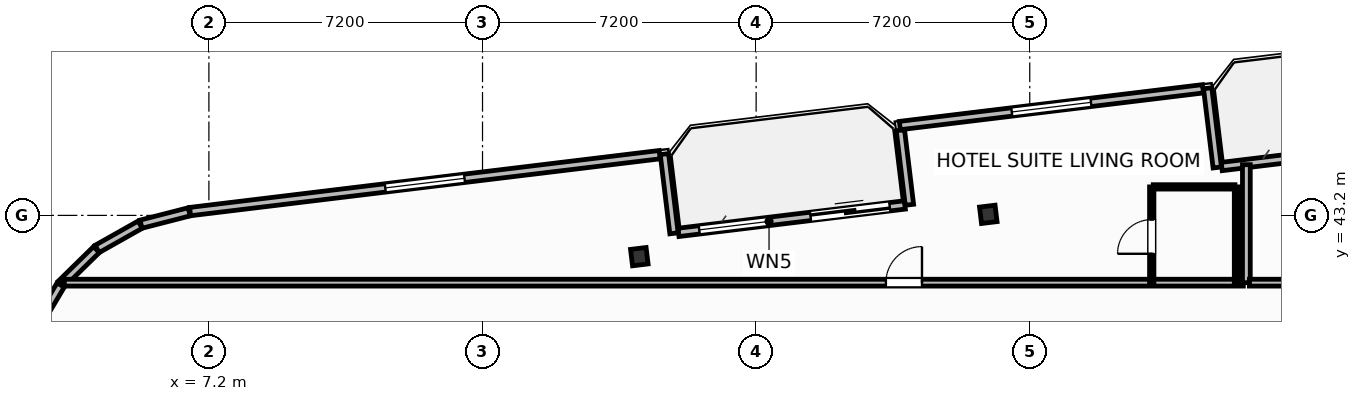
"""IFC4 building model, lengths in metres.
Left out: names, types, materials, properties, quantities, classifications, styles, units other than length and angle.
Written with IfcOpenShell. Run it as: python <this file> out.ifc"""

import sys

from ifc_helpers import new_model, si_unit, direction, frame, frame_2d, origin, origin_2d, place, context, subcontext, project, spatial, rectangle, i_section, extrude, element, fill, save


model = new_model("IFC4")
c1 = context("Model", 3, precision=1e-05, world=origin(), true_north=direction((0.0, 1.0)))
c2 = subcontext(c1, "Body", "Model", "MODEL_VIEW")
j1 = project(units=[si_unit("LENGTHUNIT", "METRE"), si_unit("PLANEANGLEUNIT", "RADIAN")], contexts=[c1])
p1 = place(None, origin())
s1 = spatial("IfcSite", under=j1, at=p1, CompositionType="ELEMENT")
p2 = place(p1, origin())
s2 = spatial("IfcBuilding", under=s1, at=p2, CompositionType="ELEMENT")
p3 = place(p2, frame((0.0, 0.0, 167.2)))
s3 = spatial("IfcBuildingStorey", under=s2, at=p3, CompositionType="ELEMENT", Elevation=167.2)
for number, where, z_axis, x_axis in (
    (1, (27.709, 43.227, 0.0), (0.0, 0.0, 1.0), (0.993, 0.12, 0.0)),
    (2, (18.526, 42.114, 0.0), (0.0, 0.0, 1.0), (0.993, 0.12, 0.0)),
):
    element("IfcColumn", number, at=place(p3, frame(where, z_axis=z_axis, x_axis=x_axis)), inside=s3, PredefinedType="COLUMN", context=c2, shape_type="SweptSolid", body=[
        extrude(i_section(OverallWidth=0.412, OverallDepth=0.435, WebThickness=0.036, FlangeThickness=0.057, FilletRadius=0.025, at=origin_2d()), origin(), (0.0, 0.0, 1.0), 3.7),
    ])
p4 = place(p3, frame((19.557, 42.753, 0.0), z_axis=(0.0, 0.0, 1.0), x_axis=(0.992729951822, 0.120362962556, 0.0)))
e3 = element("IfcWall", 3, at=p4, inside=s3, PredefinedType="SOLIDWALL", context=c2, shape_type="SweptSolid", body=[
    extrude(rectangle(XDim=6.0, YDim=0.22, at=frame_2d((3.0, 0.0))), origin(), (0.0, 0.0, 1.0), 2.73),
])
p5 = place(p4, frame((3.5, 0.0, 0.0)))
e4 = element("IfcOpeningElement", 4, at=p5, cuts=e3, PredefinedType="OPENING", context=c2, shape_type="SweptSolid", body=[
    extrude(rectangle(XDim=2.1, YDim=2.3, at=frame_2d((1.05, 1.15))), frame((0.0, 0.12, 0.0), z_axis=(0.0, -1.0, 0.0), x_axis=(1.0, 0.0, 0.0)), (0.0, 0.0, 1.0), 0.24),
])
p6 = place(p4, frame((0.55, 0.0, 0.75)))
e5 = element("IfcOpeningElement", 5, at=p6, cuts=e3, PredefinedType="OPENING", context=c2, shape_type="SweptSolid", body=[
    extrude(rectangle(XDim=1.85, YDim=1.75, at=frame_2d((0.925, 0.875))), frame((0.0, 0.12, 0.0), z_axis=(0.0, -1.0, 0.0), x_axis=(1.0, 0.0, 0.0)), (0.0, 0.0, 1.0), 0.24),
])
p7 = place(p3, frame((33.852, 44.486, 0.0), z_axis=(0.0, 0.0, 1.0), x_axis=(0.992729951822, 0.120362962556, 0.0)))
e6 = element("IfcWall", 6, at=p7, inside=s3, PredefinedType="SOLIDWALL", context=c2, shape_type="SweptSolid", body=[
    extrude(rectangle(XDim=6.0, YDim=0.22, at=frame_2d((3.0, 0.0))), origin(), (0.0, 0.0, 1.0), 2.73),
])
p8 = place(p7, frame((3.5, 0.0, 0.0)))
e7 = element("IfcOpeningElement", 7, at=p8, cuts=e6, PredefinedType="OPENING", context=c2, shape_type="SweptSolid", body=[
    extrude(rectangle(XDim=2.1, YDim=2.3, at=frame_2d((1.05, 1.15))), frame((0.0, 0.12, 0.0), z_axis=(0.0, -1.0, 0.0), x_axis=(1.0, 0.0, 0.0)), (0.0, 0.0, 1.0), 0.24),
])
p9 = place(p3, frame((33.734, 44.461, 0.0), z_axis=(0.0, 0.0, 1.0), x_axis=(-0.120327895535, 0.992734202874, 0.0)))
e8 = element("IfcWall", 8, at=p9, inside=s3, PredefinedType="SOLIDWALL", context=c2, shape_type="SweptSolid", body=[
    extrude(rectangle(XDim=2.1, YDim=0.22, at=frame_2d((1.05, 0.0))), origin(), (0.0, 0.0, 1.0), 2.73),
])
p10 = place(p3, frame((33.357, 46.531, 0.0), z_axis=(0.0, 0.0, 1.0), x_axis=(-0.992731032022, -0.120354052946, 0.0)))
e9 = element("IfcWall", 9, at=p10, inside=s3, PredefinedType="SOLIDWALL", context=c2, shape_type="SweptSolid", body=[
    extrude(rectangle(XDim=8.035, YDim=0.22, at=frame_2d((4.018, 0.0))), origin(), (0.0, 0.0, 1.0), 2.73),
])
p11 = place(p10, frame((2.968, 0.0, 0.8)))
e10 = element("IfcOpeningElement", 10, at=p11, cuts=e9, PredefinedType="OPENING", context=c2, shape_type="SweptSolid", body=[
    extrude(rectangle(XDim=2.1, YDim=1.75, at=frame_2d((1.05, 0.875))), frame((0.0, 0.12, 0.0), z_axis=(0.0, -1.0, 0.0), x_axis=(1.0, 0.0, 0.0)), (0.0, 0.0, 1.0), 0.24),
])
p12 = place(p3, frame((25.396, 45.44, 0.0), z_axis=(0.0, 0.0, 1.0), x_axis=(0.120275992932, -0.992740492538, 0.0)))
e11 = element("IfcWall", 11, at=p12, inside=s3, PredefinedType="SOLIDWALL", context=c2, shape_type="SweptSolid", body=[
    extrude(rectangle(XDim=1.975, YDim=0.22, at=frame_2d((0.988, 0.0))), origin(), (0.0, 0.0, 1.0), 2.73),
])
p13 = place(p3, frame((19.439, 42.729, 0.0), z_axis=(0.0, 0.0, 1.0), x_axis=(-0.120327895535, 0.992734202874, 0.0)))
e12 = element("IfcWall", 12, at=p13, inside=s3, PredefinedType="SOLIDWALL", context=c2, shape_type="SweptSolid", body=[
    extrude(rectangle(XDim=2.1, YDim=0.22, at=frame_2d((1.05, 0.0))), origin(), (0.0, 0.0, 1.0), 2.73),
])
p14 = place(p3, frame((19.062, 44.798, 0.0), z_axis=(0.0, 0.0, 1.0), x_axis=(-0.992733569027, -0.120333124809, 0.0)))
e13 = element("IfcWall", 13, at=p14, inside=s3, PredefinedType="SOLIDWALL", context=c2, shape_type="SweptSolid", body=[
    extrude(rectangle(XDim=12.447, YDim=0.22, at=frame_2d((6.224, 0.0))), origin(), (0.0, 0.0, 1.0), 2.73),
])
p15 = place(p14, frame((5.174, 0.0, 0.8)))
e14 = element("IfcOpeningElement", 14, at=p15, cuts=e13, PredefinedType="OPENING", context=c2, shape_type="SweptSolid", body=[
    extrude(rectangle(XDim=2.1, YDim=1.75, at=frame_2d((1.05, 0.875))), frame((0.0, 0.12, 0.0), z_axis=(0.0, -1.0, 0.0), x_axis=(1.0, 0.0, 0.0)), (0.0, 0.0, 1.0), 0.24),
])
p16 = place(p3, frame((6.681, 43.294, 0.0), z_axis=(0.0, 0.0, 1.0), x_axis=(-0.968496788899, -0.2490260426, 0.0)))
e15 = element("IfcWall", 15, at=p16, inside=s3, PredefinedType="SOLIDWALL", context=c2, shape_type="SweptSolid", body=[
    extrude(rectangle(XDim=1.309, YDim=0.22, at=frame_2d((0.654, 0.0))), origin(), (0.0, 0.0, 1.0), 2.73),
])
for number, where, z_axis, x_axis in (
    (16, (5.392, 42.956, 0.0), (0.0, 0.0, 1.0), (-0.871, -0.491, 0.0)),
    (17, (4.241, 42.3, 0.0), (0.0, 0.0, 1.0), (-0.714, -0.7, 0.0)),
):
    element("IfcWall", number, at=place(p3, frame(where, z_axis=z_axis, x_axis=x_axis)), inside=s3, PredefinedType="SOLIDWALL", context=c2, shape_type="SweptSolid", body=[
        extrude(rectangle(XDim=1.301, YDim=0.22, at=frame_2d((0.65, 0.0))), origin(), (0.0, 0.0, 1.0), 2.73),
    ])
p17 = place(p3, frame((3.299, 41.368, 0.0), z_axis=(0.0, 0.0, 1.0), x_axis=(-0.508716668029, -0.860933999601, 0.0)))
e18 = element("IfcWall", 18, at=p17, inside=s3, PredefinedType="SOLIDWALL", context=c2, shape_type="SweptSolid", body=[
    extrude(rectangle(XDim=1.301, YDim=0.22, at=frame_2d((0.65, 0.0))), origin(), (0.0, 0.0, 1.0), 2.73),
])
p18 = place(p3, frame((3.393, 41.43, 0.0), z_axis=(0.0, 0.0, 1.0), x_axis=(1.0, 0.0, 0.0)))
e19 = element("IfcWall", 19, at=p18, inside=s3, PredefinedType="PARTITIONING", context=c2, shape_type="SweptSolid", body=[
    extrude(rectangle(XDim=31.027, YDim=0.18, at=frame_2d((15.513, 0.0))), origin(), (0.0, 0.0, 1.0), 2.662),
])
p19 = place(p18, frame((21.621, 0.0, 0.0)))
e20 = element("IfcOpeningElement", 20, at=p19, cuts=e19, PredefinedType="OPENING", context=c2, shape_type="SweptSolid", body=[
    extrude(rectangle(XDim=0.95, YDim=2.15, at=frame_2d((0.475, 1.075))), frame((0.0, 0.1, 0.0), z_axis=(0.0, -1.0, 0.0), x_axis=(1.0, 0.0, 0.0)), (0.0, 0.0, 1.0), 0.2),
])
p20 = place(p3, frame((32.05, 43.95, 0.0), z_axis=(0.0, 0.0, 1.0), x_axis=(1.0, 0.0, 0.0)))
e21 = element("IfcWall", 21, at=p20, inside=s3, PredefinedType="PARTITIONING", context=c2, shape_type="SweptSolid", body=[
    extrude(rectangle(XDim=2.15, YDim=0.115, at=frame_2d((1.075, 0.0))), origin(), (0.0, 0.0, 1.0), 2.824),
])
p21 = place(p3, frame((32.01, 41.43, 0.0), z_axis=(0.0, 0.0, 1.0), x_axis=(0.0, 1.0, 0.0)))
e22 = element("IfcWall", 22, at=p21, inside=s3, PredefinedType="PARTITIONING", context=c2, shape_type="SweptSolid", body=[
    extrude(rectangle(XDim=2.52, YDim=0.115, at=frame_2d((1.26, 0.0))), origin(), (0.0, 0.0, 1.0), 3.45),
])
p22 = place(p21, frame((0.76, 0.0, 0.0)))
e23 = element("IfcOpeningElement", 23, at=p22, cuts=e22, PredefinedType="OPENING", context=c2, shape_type="SweptSolid", body=[
    extrude(rectangle(XDim=0.9, YDim=2.05, at=frame_2d((0.45, 1.025))), frame((0.0, 0.067, 0.0), z_axis=(0.0, -1.0, 0.0), x_axis=(1.0, 0.0, 0.0)), (0.0, 0.0, 1.0), 0.135),
])
p23 = place(p3, frame((34.24, 41.43, 0.0), z_axis=(0.0, 0.0, 1.0), x_axis=(0.0, 1.0, 0.0)))
e24 = element("IfcWall", 24, at=p23, inside=s3, PredefinedType="PARTITIONING", context=c2, shape_type="SweptSolid", body=[
    extrude(rectangle(XDim=2.52, YDim=0.115, at=frame_2d((1.26, 0.0))), origin(), (0.0, 0.0, 1.0), 3.45),
])
p24 = place(p3, frame((34.5, 41.43, 0.0), z_axis=(0.0, 0.0, 1.0), x_axis=(0.0, 1.0, 0.0)))
e25 = element("IfcWall", 25, at=p24, inside=s3, PredefinedType="PARTITIONING", context=c2, shape_type="SweptSolid", body=[
    extrude(rectangle(XDim=3.104, YDim=0.205, at=frame_2d((1.552, 0.0))), origin(), (0.0, 0.0, 1.0), 3.45),
])
p25 = place(p3, frame((34.58, 41.43, 0.0), z_axis=(0.0, 0.0, 1.0), x_axis=(1.0, 0.0, 0.0)))
e26 = element("IfcWall", 26, at=p25, inside=s3, PredefinedType="PARTITIONING", context=c2, shape_type="SweptSolid", body=[
    extrude(rectangle(XDim=11.84, YDim=0.18, at=frame_2d((5.92, 0.0))), origin(), (0.0, 0.0, 1.0), 3.45),
])
p26 = place(p25, frame((7.68, 0.0, 0.0)))
e27 = element("IfcOpeningElement", 27, at=p26, cuts=e26, PredefinedType="OPENING", context=c2, shape_type="SweptSolid", body=[
    extrude(rectangle(XDim=0.95, YDim=2.15, at=frame_2d((0.475, 1.075))), frame((0.0, 0.1, 0.0), z_axis=(0.0, -1.0, 0.0), x_axis=(1.0, 0.0, 0.0)), (0.0, 0.0, 1.0), 0.2),
])
p27 = place(p5, origin())
e28 = element("IfcDoor", 28, at=p27, inside=s3, OperationType="SLIDING_TO_LEFT", PredefinedType="DOOR", context=c2, shape_type="SweptSolid", body=[
    extrude(rectangle(XDim=2.1, YDim=2.3, at=frame_2d((1.05, 1.15))), frame((0.0, 0.025, 0.0), z_axis=(0.0, -1.0, 0.0), x_axis=(1.0, 0.0, 0.0)), (0.0, 0.0, 1.0), 0.05),
])
fill(e4, e28)
p28 = place(p6, origin())
e29 = element("IfcWindow", 29, at=p28, inside=s3, PartitioningType="SINGLE_PANEL", PredefinedType="WINDOW", context=c2, shape_type="SweptSolid", body=[
    extrude(rectangle(XDim=1.85, YDim=1.75, at=frame_2d((0.925, 0.875))), frame((0.0, 0.03, 0.0), z_axis=(0.0, -1.0, 0.0), x_axis=(1.0, 0.0, 0.0)), (0.0, 0.0, 1.0), 0.06),
])
fill(e5, e29)
p29 = place(p11, origin())
e30 = element("IfcWindow", 30, at=p29, inside=s3, PartitioningType="SINGLE_PANEL", PredefinedType="WINDOW", context=c2, shape_type="SweptSolid", body=[
    extrude(rectangle(XDim=2.1, YDim=1.75, at=frame_2d((1.05, 0.875))), frame((0.0, 0.03, 0.0), z_axis=(0.0, -1.0, 0.0), x_axis=(1.0, 0.0, 0.0)), (0.0, 0.0, 1.0), 0.06),
])
fill(e10, e30)
p30 = place(p15, origin())
e31 = element("IfcWindow", 31, at=p30, inside=s3, PartitioningType="SINGLE_PANEL", PredefinedType="WINDOW", context=c2, shape_type="SweptSolid", body=[
    extrude(rectangle(XDim=2.1, YDim=1.75, at=frame_2d((1.05, 0.875))), frame((0.0, 0.03, 0.0), z_axis=(0.0, -1.0, 0.0), x_axis=(1.0, 0.0, 0.0)), (0.0, 0.0, 1.0), 0.06),
])
fill(e14, e31)
p31 = place(p19, origin())
e32 = element("IfcDoor", 32, at=p31, inside=s3, OperationType="SINGLE_SWING_RIGHT", PredefinedType="DOOR", context=c2, shape_type="SweptSolid", body=[
    extrude(rectangle(XDim=0.95, YDim=2.15, at=frame_2d((0.475, 1.075))), frame((0.0, 0.025, 0.0), z_axis=(0.0, -1.0, 0.0), x_axis=(1.0, 0.0, 0.0)), (0.0, 0.0, 1.0), 0.05),
])
fill(e20, e32)
p32 = place(p22, origin())
e33 = element("IfcDoor", 33, at=p32, inside=s3, OperationType="SINGLE_SWING_LEFT", PredefinedType="DOOR", context=c2, shape_type="SweptSolid", body=[
    extrude(rectangle(XDim=0.9, YDim=2.05, at=frame_2d((0.45, 1.025))), frame((0.0, 0.025, 0.0), z_axis=(0.0, -1.0, 0.0), x_axis=(1.0, 0.0, 0.0)), (0.0, 0.0, 1.0), 0.05),
])
fill(e23, e33)
save(model, sys.argv[1])
